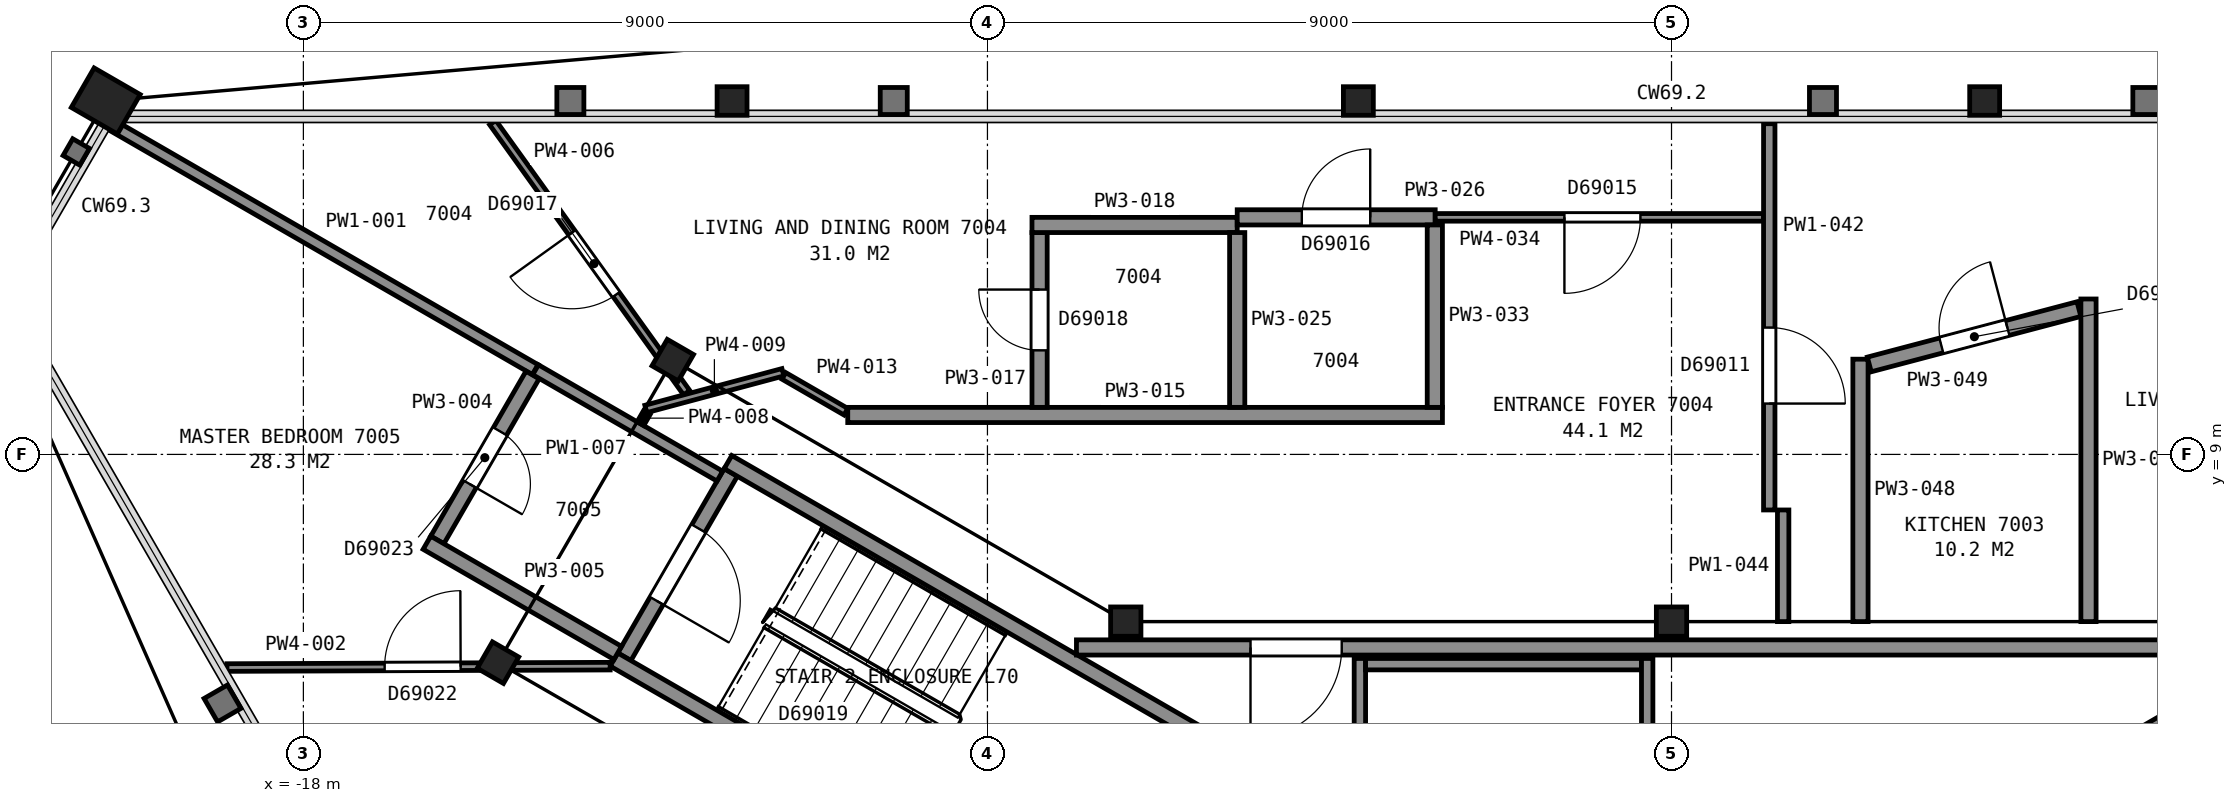
"""IFC4 building model, lengths in metres.
Left out: names, types, materials, properties, quantities, classifications, styles, units other than length and angle.
Written with IfcOpenShell. Run it as: python <this file> out.ifc"""

import sys

from ifc_helpers import new_model, si_unit, direction, frame, frame_2d, origin, origin_2d, place, context, subcontext, project, spatial, rectangle, hollow_rectangle, i_section, extrude, element, fill, save


model = new_model("IFC4")
c1 = context("Model", 3, precision=1e-05, world=origin(), true_north=direction((0.0, 1.0)))
c2 = subcontext(c1, "Body", "Model", "MODEL_VIEW")
j1 = project(units=[si_unit("LENGTHUNIT", "METRE"), si_unit("PLANEANGLEUNIT", "RADIAN")], contexts=[c1])
p1 = place(None, origin())
s1 = spatial("IfcSite", under=j1, at=p1, CompositionType="ELEMENT")
p2 = place(p1, origin())
s2 = spatial("IfcBuilding", under=s1, at=p2, CompositionType="ELEMENT")
p3 = place(p2, frame((0.0, 0.0, 278.8)))
s3 = spatial("IfcBuildingStorey", under=s2, at=p3, CompositionType="ELEMENT", Elevation=278.8)
for number, where, z_axis, x_axis in (
    (1, (4.12, 13.65, 0.0), (0.0, 0.0, 1.0), (1.0, 0.0, 0.0)),
    (2, (-4.12, 13.65, 0.0), (0.0, 0.0, 1.0), (1.0, 0.0, 0.0)),
    (3, (-12.36, 13.65, 0.0), (0.0, 0.0, 1.0), (1.0, 0.0, 0.0)),
):
    element("IfcColumn", number, at=place(p3, frame(where, z_axis=z_axis, x_axis=x_axis)), inside=s3, PredefinedType="COLUMN", context=c2, shape_type="SweptSolid", body=[
        extrude(i_section(OverallWidth=0.394, OverallDepth=0.376, WebThickness=0.017, FlangeThickness=0.028, FilletRadius=0.015, at=origin_2d()), origin(), (0.0, 0.0, 1.0), 3.7),
    ])
p4 = place(p3, frame((-20.6, 13.65, 0.0), z_axis=(0.0, 0.0, 1.0), x_axis=(0.5, 0.866025403784, 0.0)))
e4 = element("IfcColumn", 4, at=p4, inside=s3, PredefinedType="COLUMN", context=c2, shape_type="SweptSolid", body=[
    extrude(hollow_rectangle(XDim=0.6, YDim=0.7, WallThickness=0.04, at=origin_2d()), origin(), (0.0, 0.0, 1.0), 3.7),
])
for number, where, z_axis, x_axis in (
    (5, (0.0, 6.8, 0.0), (0.0, 0.0, 1.0), (1.0, 0.0, 0.0)),
    (6, (-7.18, 6.8, 0.0), (0.0, 0.0, 1.0), (1.0, 0.0, 0.0)),
):
    element("IfcColumn", number, at=place(p3, frame(where, z_axis=z_axis, x_axis=x_axis)), inside=s3, PredefinedType="COLUMN", context=c2, shape_type="SweptSolid", body=[
        extrude(i_section(OverallWidth=0.399, OverallDepth=0.386, WebThickness=0.021, FlangeThickness=0.033, FilletRadius=0.015, at=origin_2d()), origin(), (0.0, 0.0, 1.0), 3.7),
    ])
for number, where, z_axis, x_axis in (
    (7, (-13.14, 10.24, 0.0), (0.0, 0.0, 1.0), (0.5, 0.866, 0.0)),
    (8, (-15.44, 6.26, 0.0), (0.0, 0.0, 1.0), (0.5, 0.866, 0.0)),
):
    element("IfcColumn", number, at=place(p3, frame(where, z_axis=z_axis, x_axis=x_axis)), inside=s3, PredefinedType="COLUMN", context=c2, shape_type="SweptSolid", body=[
        extrude(i_section(OverallWidth=0.401, OverallDepth=0.399, WebThickness=0.025, FlangeThickness=0.04, FilletRadius=0.015, at=origin_2d()), origin(), (0.0, 0.0, 1.0), 3.7),
    ])
p5 = place(p3, frame((6.178, 5.299, 0.0), z_axis=(0.0, 0.0, 1.0), x_axis=(0.866033125095, 0.499986626058, 0.0)))
e9 = element("IfcWall", 9, at=p5, inside=s3, PredefinedType="PARTITIONING", context=c2, shape_type="SweptSolid", body=[
    extrude(rectangle(XDim=7.2, YDim=0.2, at=frame_2d((3.6, 0.0))), origin(), (0.0, 0.0, 1.0), 3.45),
])
p6 = place(p3, frame((-12.377, 8.762, 0.0), z_axis=(0.0, 0.0, 1.0), x_axis=(-0.500049511043, -0.865996816683, 0.0)))
e10 = element("IfcWall", 10, at=p6, inside=s3, PredefinedType="PARTITIONING", context=c2, shape_type="SweptSolid", body=[
    extrude(rectangle(XDim=2.8, YDim=0.2, at=frame_2d((1.4, 0.0))), origin(), (0.0, 0.0, 1.0), 3.45),
])
p7 = place(p6, frame((0.85, 0.0, 0.0)))
e11 = element("IfcOpeningElement", 11, at=p7, cuts=e10, PredefinedType="OPENING", context=c2, shape_type="SweptSolid", body=[
    extrude(rectangle(XDim=1.1, YDim=2.1, at=frame_2d((0.55, 1.05))), frame((0.0, 0.11, 0.0), z_axis=(0.0, -1.0, 0.0), x_axis=(1.0, 0.0, 0.0)), (0.0, 0.0, 1.0), 0.22),
])
for number, where, z_axis, x_axis in (
    (12, (-7.678, 2.701, 0.0), (0.0, 0.0, 1.0), (-0.866, 0.5, 0.0)),
    (13, (-6.178, 5.299, 0.0), (0.0, 0.0, 1.0), (-0.866, 0.5, 0.0)),
):
    element("IfcWall", number, at=place(p3, frame(where, z_axis=z_axis, x_axis=x_axis)), inside=s3, PredefinedType="PARTITIONING", context=c2, shape_type="SweptSolid", body=[
        extrude(rectangle(XDim=7.2, YDim=0.2, at=frame_2d((3.6, 0.0))), origin(), (0.0, 0.0, 1.0), 3.45),
    ])
p8 = place(p3, frame((7.829, 6.46, 0.0), z_axis=(0.0, 0.0, 1.0), x_axis=(-1.0, 0.0, 0.0)))
e14 = element("IfcWall", 14, at=p8, inside=s3, PredefinedType="PARTITIONING", context=c2, shape_type="SweptSolid", body=[
    extrude(rectangle(XDim=15.658, YDim=0.2, at=frame_2d((7.829, 0.0))), origin(), (0.0, 0.0, 1.0), 3.45),
])
p9 = place(p8, frame((12.168, 0.0, 0.0)))
e15 = element("IfcOpeningElement", 15, at=p9, cuts=e14, PredefinedType="OPENING", context=c2, shape_type="SweptSolid", body=[
    extrude(rectangle(XDim=1.2, YDim=2.1, at=frame_2d((0.6, 1.05))), frame((0.0, 0.11, 0.0), z_axis=(0.0, -1.0, 0.0), x_axis=(1.0, 0.0, 0.0)), (0.0, 0.0, 1.0), 0.22),
])
p10 = place(p3, frame((-4.1, 2.085, 0.0), z_axis=(0.0, 0.0, 1.0), x_axis=(0.0, 1.0, 0.0)))
e16 = element("IfcWall", 16, at=p10, inside=s3, PredefinedType="PARTITIONING", context=c2, shape_type="SweptSolid", body=[
    extrude(rectangle(XDim=4.23, YDim=0.15, at=frame_2d((2.115, 0.0))), origin(), (0.0, 0.0, 1.0), 3.45),
])
p11 = place(p10, frame((1.625, 0.0, 0.0)))
e17 = element("IfcOpeningElement", 17, at=p11, cuts=e16, PredefinedType="OPENING", context=c2, shape_type="SweptSolid", body=[
    extrude(rectangle(XDim=1.0, YDim=2.1, at=frame_2d((0.5, 1.05))), frame((0.0, 0.085, 0.0), z_axis=(0.0, -1.0, 0.0), x_axis=(1.0, 0.0, 0.0)), (0.0, 0.0, 1.0), 0.17),
])
p12 = place(p3, frame((-4.025, 6.24, 0.0), z_axis=(0.0, 0.0, 1.0), x_axis=(1.0, 0.0, 0.0)))
e18 = element("IfcWall", 18, at=p12, inside=s3, PredefinedType="PARTITIONING", context=c2, shape_type="SweptSolid", body=[
    extrude(rectangle(XDim=3.63, YDim=0.15, at=frame_2d((1.815, 0.0))), origin(), (0.0, 0.0, 1.0), 3.45),
])
p13 = place(p3, frame((-0.32, 2.252, 0.0), z_axis=(0.0, 0.0, 1.0), x_axis=(0.0, 1.0, 0.0)))
e19 = element("IfcWall", 19, at=p13, inside=s3, PredefinedType="PARTITIONING", context=c2, shape_type="SweptSolid", body=[
    extrude(rectangle(XDim=4.063, YDim=0.15, at=frame_2d((2.031, 0.0))), origin(), (0.0, 0.0, 1.0), 3.45),
])
p14 = place(p3, frame((-20.506, 13.324, 0.0), z_axis=(0.0, 0.0, 1.0), x_axis=(0.866004971522, -0.500035388047, 0.0)))
e20 = element("IfcWall", 20, at=p14, inside=s3, PredefinedType="PARTITIONING", context=c2, shape_type="SweptSolid", body=[
    extrude(rectangle(XDim=6.416, YDim=0.15, at=frame_2d((3.208, 0.0))), origin(), (0.0, 0.0, 1.0), 2.723),
])
p15 = place(p3, frame((-19.005, 6.196, 0.0), z_axis=(0.0, 0.0, 1.0), x_axis=(0.999993403855, 0.003632113191, 0.0)))
e21 = element("IfcWall", 21, at=p15, inside=s3, PredefinedType="PARTITIONING", context=c2, shape_type="SweptSolid", body=[
    extrude(rectangle(XDim=5.041, YDim=0.1, at=frame_2d((2.521, 0.0))), origin(), (0.0, 0.0, 1.0), 2.723),
])
p16 = place(p15, frame((2.074, 0.0, 0.0)))
e22 = element("IfcOpeningElement", 22, at=p16, cuts=e21, PredefinedType="OPENING", context=c2, shape_type="SweptSolid", body=[
    extrude(rectangle(XDim=1.0, YDim=2.1, at=frame_2d((0.5, 1.05))), frame((0.0, 0.06, 0.0), z_axis=(0.0, -1.0, 0.0), x_axis=(1.0, 0.0, 0.0)), (0.0, 0.0, 1.0), 0.12),
])
p17 = place(p3, frame((-14.985, 10.045, 0.0), z_axis=(0.0, 0.0, 1.0), x_axis=(-0.499995137693, -0.86602821102, 0.0)))
e23 = element("IfcWall", 23, at=p17, inside=s3, PredefinedType="PARTITIONING", context=c2, shape_type="SweptSolid", body=[
    extrude(rectangle(XDim=2.506, YDim=0.2, at=frame_2d((1.253, 0.0))), origin(), (0.0, 0.0, 1.0), 2.723),
])
p18 = place(p17, frame((0.856, 0.0, 0.0)))
e24 = element("IfcOpeningElement", 24, at=p18, cuts=e23, PredefinedType="OPENING", context=c2, shape_type="SweptSolid", body=[
    extrude(rectangle(XDim=0.8, YDim=2.1, at=frame_2d((0.4, 1.05))), frame((0.0, 0.11, 0.0), z_axis=(0.0, -1.0, 0.0), x_axis=(1.0, 0.0, 0.0)), (0.0, 0.0, 1.0), 0.22),
])
p19 = place(p3, frame((-16.375, 7.838, 0.0), z_axis=(0.0, 0.0, 1.0), x_axis=(0.865912083802, -0.500196224622, 0.0)))
e25 = element("IfcWall", 25, at=p19, inside=s3, PredefinedType="PARTITIONING", context=c2, shape_type="SweptSolid", body=[
    extrude(rectangle(XDim=2.899, YDim=0.2, at=frame_2d((1.45, 0.0))), origin(), (0.0, 0.0, 1.0), 2.723),
])
p20 = place(p3, frame((-12.957, 9.812, 0.0), z_axis=(0.0, 0.0, 1.0), x_axis=(-0.58313691272, 0.812373892381, 0.0)))
e26 = element("IfcWall", 26, at=p20, inside=s3, PredefinedType="PARTITIONING", context=c2, shape_type="SweptSolid", body=[
    extrude(rectangle(XDim=4.375, YDim=0.1, at=frame_2d((2.188, 0.0))), origin(), (0.0, 0.0, 1.0), 2.723),
])
p21 = place(p20, frame((1.59, 0.0, 0.0)))
e27 = element("IfcOpeningElement", 27, at=p21, cuts=e26, PredefinedType="OPENING", context=c2, shape_type="SweptSolid", body=[
    extrude(rectangle(XDim=1.0, YDim=2.1, at=frame_2d((0.5, 1.05))), frame((0.0, 0.06, 0.0), z_axis=(0.0, -1.0, 0.0), x_axis=(1.0, 0.0, 0.0)), (0.0, 0.0, 1.0), 0.12),
])
p22 = place(p3, frame((-14.945, 10.114, 0.0), z_axis=(0.0, 0.0, 1.0), x_axis=(0.865969158485, -0.500097407065, 0.0)))
e28 = element("IfcWall", 28, at=p22, inside=s3, PredefinedType="PARTITIONING", context=c2, shape_type="SweptSolid", body=[
    extrude(rectangle(XDim=2.799, YDim=0.15, at=frame_2d((1.4, 0.0))), origin(), (0.0, 0.0, 1.0), 2.723),
])
p23 = place(p3, frame((-13.565, 9.404, 0.0), z_axis=(0.0, 0.0, 1.0), x_axis=(0.500181256421, 0.865920730047, 0.0)))
e29 = element("IfcWall", 29, at=p23, inside=s3, PredefinedType="PARTITIONING", context=c2, shape_type="SweptSolid", body=[
    extrude(rectangle(XDim=0.169, YDim=0.1, at=frame_2d((0.084, 0.0))), origin(), (0.0, 0.0, 1.0), 2.723),
])
p24 = place(p3, frame((-13.494, 9.598, 0.0), z_axis=(0.0, 0.0, 1.0), x_axis=(0.96601104623, 0.258500790254, 0.0)))
e30 = element("IfcWall", 30, at=p24, inside=s3, PredefinedType="PARTITIONING", context=c2, shape_type="SweptSolid", body=[
    extrude(rectangle(XDim=1.867, YDim=0.1, at=frame_2d((0.934, 0.0))), origin(), (0.0, 0.0, 1.0), 2.723),
])
p25 = place(p3, frame((-11.678, 10.033, 0.0), z_axis=(0.0, 0.0, 1.0), x_axis=(0.866116627388, -0.499841962787, 0.0)))
e31 = element("IfcWall", 31, at=p25, inside=s3, PredefinedType="PARTITIONING", context=c2, shape_type="SweptSolid", body=[
    extrude(rectangle(XDim=0.943, YDim=0.1, at=frame_2d((0.472, 0.0))), origin(), (0.0, 0.0, 1.0), 2.723),
])
p26 = place(p3, frame((-10.838, 9.519, 0.0), z_axis=(0.0, 0.0, 1.0), x_axis=(1.0, 0.0, 0.0)))
e32 = element("IfcWall", 32, at=p26, inside=s3, PredefinedType="PARTITIONING", context=c2, shape_type="SweptSolid", body=[
    extrude(rectangle(XDim=7.824, YDim=0.2, at=frame_2d((3.912, 0.0))), origin(), (0.0, 0.0, 1.0), 2.723),
])
p27 = place(p3, frame((-8.314, 11.919, 0.0), z_axis=(0.0, 0.0, 1.0), x_axis=(0.0, -1.0, 0.0)))
e33 = element("IfcWall", 33, at=p27, inside=s3, PredefinedType="PARTITIONING", context=c2, shape_type="SweptSolid", body=[
    extrude(rectangle(XDim=2.3, YDim=0.2, at=frame_2d((1.15, 0.0))), origin(), (0.0, 0.0, 1.0), 2.723),
])
p28 = place(p27, frame((0.75, 0.0, 0.0)))
e34 = element("IfcOpeningElement", 34, at=p28, cuts=e33, PredefinedType="OPENING", context=c2, shape_type="SweptSolid", body=[
    extrude(rectangle(XDim=0.8, YDim=2.1, at=frame_2d((0.4, 1.05))), frame((0.0, 0.11, 0.0), z_axis=(0.0, -1.0, 0.0), x_axis=(1.0, 0.0, 0.0)), (0.0, 0.0, 1.0), 0.22),
])
p29 = place(p3, frame((-8.414, 12.019, 0.0), z_axis=(0.0, 0.0, 1.0), x_axis=(1.0, 0.0, 0.0)))
e35 = element("IfcWall", 35, at=p29, inside=s3, PredefinedType="PARTITIONING", context=c2, shape_type="SweptSolid", body=[
    extrude(rectangle(XDim=2.7, YDim=0.2, at=frame_2d((1.35, 0.0))), origin(), (0.0, 0.0, 1.0), 2.723),
])
p30 = place(p3, frame((-5.714, 9.619, 0.0), z_axis=(0.0, 0.0, 1.0), x_axis=(0.0, 1.0, 0.0)))
e36 = element("IfcWall", 36, at=p30, inside=s3, PredefinedType="PARTITIONING", context=c2, shape_type="SweptSolid", body=[
    extrude(rectangle(XDim=2.3, YDim=0.2, at=frame_2d((1.15, 0.0))), origin(), (0.0, 0.0, 1.0), 2.723),
])
p31 = place(p3, frame((-3.109, 12.119, 0.0), z_axis=(0.0, 0.0, 1.0), x_axis=(-1.0, 0.0, 0.0)))
e37 = element("IfcWall", 37, at=p31, inside=s3, PredefinedType="PARTITIONING", context=c2, shape_type="SweptSolid", body=[
    extrude(rectangle(XDim=2.605, YDim=0.2, at=frame_2d((1.303, 0.0))), origin(), (0.0, 0.0, 1.0), 2.723),
])
p32 = place(p31, frame((0.855, 0.0, 0.0)))
e38 = element("IfcOpeningElement", 38, at=p32, cuts=e37, PredefinedType="OPENING", context=c2, shape_type="SweptSolid", body=[
    extrude(rectangle(XDim=0.9, YDim=2.1, at=frame_2d((0.45, 1.05))), frame((0.0, 0.11, 0.0), z_axis=(0.0, -1.0, 0.0), x_axis=(1.0, 0.0, 0.0)), (0.0, 0.0, 1.0), 0.22),
])
p33 = place(p3, frame((-3.114, 9.619, 0.0), z_axis=(0.0, 0.0, 1.0), x_axis=(0.0, 1.0, 0.0)))
e39 = element("IfcWall", 39, at=p33, inside=s3, PredefinedType="PARTITIONING", context=c2, shape_type="SweptSolid", body=[
    extrude(rectangle(XDim=2.4, YDim=0.2, at=frame_2d((1.2, 0.0))), origin(), (0.0, 0.0, 1.0), 2.723),
])
p34 = place(p3, frame((-3.109, 12.119, 0.0), z_axis=(0.0, 0.0, 1.0), x_axis=(1.0, 0.0, 0.0)))
e40 = element("IfcWall", 40, at=p34, inside=s3, PredefinedType="PARTITIONING", context=c2, shape_type="SweptSolid", body=[
    extrude(rectangle(XDim=4.32, YDim=0.1, at=frame_2d((2.16, 0.0))), origin(), (0.0, 0.0, 1.0), 2.723),
])
p35 = place(p34, frame((1.7, 0.0, 0.0)))
e41 = element("IfcOpeningElement", 41, at=p35, cuts=e40, PredefinedType="OPENING", context=c2, shape_type="SweptSolid", body=[
    extrude(rectangle(XDim=1.0, YDim=2.1, at=frame_2d((0.5, 1.05))), frame((0.0, 0.06, 0.0), z_axis=(0.0, -1.0, 0.0), x_axis=(1.0, 0.0, 0.0)), (0.0, 0.0, 1.0), 0.12),
])
p36 = place(p3, frame((1.286, 13.351, 0.0), z_axis=(0.0, 0.0, 1.0), x_axis=(0.0, -1.0, 0.0)))
e42 = element("IfcWall", 42, at=p36, inside=s3, PredefinedType="PARTITIONING", context=c2, shape_type="SweptSolid", body=[
    extrude(rectangle(XDim=5.082, YDim=0.15, at=frame_2d((2.541, 0.0))), origin(), (0.0, 0.0, 1.0), 2.723),
])
p37 = place(p36, frame((2.682, 0.0, 0.0)))
e43 = element("IfcOpeningElement", 43, at=p37, cuts=e42, PredefinedType="OPENING", context=c2, shape_type="SweptSolid", body=[
    extrude(rectangle(XDim=1.0, YDim=2.1, at=frame_2d((0.5, 1.05))), frame((0.0, 0.085, 0.0), z_axis=(0.0, -1.0, 0.0), x_axis=(1.0, 0.0, 0.0)), (0.0, 0.0, 1.0), 0.17),
])
p38 = place(p3, frame((1.469, 6.8, 0.0), z_axis=(0.0, 0.0, 1.0), x_axis=(0.0, 1.0, 0.0)))
e44 = element("IfcWall", 44, at=p38, inside=s3, PredefinedType="PARTITIONING", context=c2, shape_type="SweptSolid", body=[
    extrude(rectangle(XDim=1.469, YDim=0.15, at=frame_2d((0.734, 0.0))), origin(), (0.0, 0.0, 1.0), 2.723),
])
p39 = place(p3, frame((2.486, 6.8, 0.0), z_axis=(0.0, 0.0, 1.0), x_axis=(0.0, 1.0, 0.0)))
e45 = element("IfcWall", 45, at=p39, inside=s3, PredefinedType="PARTITIONING", context=c2, shape_type="SweptSolid", body=[
    extrude(rectangle(XDim=3.453, YDim=0.2, at=frame_2d((1.727, 0.0))), origin(), (0.0, 0.0, 1.0), 2.723),
])
p40 = place(p3, frame((5.36, 10.912, 0.0), z_axis=(0.0, 0.0, 1.0), x_axis=(-0.966866921155, -0.255280936963, 0.0)))
e46 = element("IfcWall", 46, at=p40, inside=s3, PredefinedType="PARTITIONING", context=c2, shape_type="SweptSolid", body=[
    extrude(rectangle(XDim=2.853, YDim=0.2, at=frame_2d((1.426, 0.0))), origin(), (0.0, 0.0, 1.0), 2.723),
])
p41 = place(p40, frame((0.973, 0.0, 0.0)))
e47 = element("IfcOpeningElement", 47, at=p41, cuts=e46, PredefinedType="OPENING", context=c2, shape_type="SweptSolid", body=[
    extrude(rectangle(XDim=0.9, YDim=2.1, at=frame_2d((0.45, 1.05))), frame((0.0, 0.11, 0.0), z_axis=(0.0, -1.0, 0.0), x_axis=(1.0, 0.0, 0.0)), (0.0, 0.0, 1.0), 0.22),
])
p42 = place(p3, frame((5.486, 6.8, 0.0), z_axis=(0.0, 0.0, 1.0), x_axis=(0.0, 1.0, 0.0)))
e48 = element("IfcWall", 48, at=p42, inside=s3, PredefinedType="PARTITIONING", context=c2, shape_type="SweptSolid", body=[
    extrude(rectangle(XDim=4.245, YDim=0.2, at=frame_2d((2.123, 0.0))), origin(), (0.0, 0.0, 1.0), 2.723),
])
p43 = place(p7, origin())
e49 = element("IfcDoor", 49, at=p43, inside=s3, OperationType="SINGLE_SWING_RIGHT", PredefinedType="DOOR", context=c2, shape_type="SweptSolid", body=[
    extrude(rectangle(XDim=1.1, YDim=2.1, at=frame_2d((0.55, 1.05))), frame((0.0, 0.025, 0.0), z_axis=(0.0, -1.0, 0.0), x_axis=(1.0, 0.0, 0.0)), (0.0, 0.0, 1.0), 0.05),
])
fill(e11, e49)
p44 = place(p9, origin())
e50 = element("IfcDoor", 50, at=p44, inside=s3, OperationType="SINGLE_SWING_RIGHT", PredefinedType="DOOR", context=c2, shape_type="SweptSolid", body=[
    extrude(rectangle(XDim=1.2, YDim=2.1, at=frame_2d((0.6, 1.05))), frame((0.0, 0.025, 0.0), z_axis=(0.0, -1.0, 0.0), x_axis=(1.0, 0.0, 0.0)), (0.0, 0.0, 1.0), 0.05),
])
fill(e15, e50)
p45 = place(p16, origin())
e51 = element("IfcDoor", 51, at=p45, inside=s3, OperationType="SINGLE_SWING_RIGHT", PredefinedType="DOOR", context=c2, shape_type="SweptSolid", body=[
    extrude(rectangle(XDim=1.0, YDim=2.1, at=frame_2d((0.5, 1.05))), frame((0.0, 0.025, 0.0), z_axis=(0.0, -1.0, 0.0), x_axis=(1.0, 0.0, 0.0)), (0.0, 0.0, 1.0), 0.05),
])
fill(e22, e51)
p46 = place(p18, origin())
e52 = element("IfcDoor", 52, at=p46, inside=s3, OperationType="SINGLE_SWING_RIGHT", PredefinedType="DOOR", context=c2, shape_type="SweptSolid", body=[
    extrude(rectangle(XDim=0.8, YDim=2.1, at=frame_2d((0.4, 1.05))), frame((0.0, 0.025, 0.0), z_axis=(0.0, -1.0, 0.0), x_axis=(1.0, 0.0, 0.0)), (0.0, 0.0, 1.0), 0.05),
])
fill(e24, e52)
p47 = place(p21, origin())
e53 = element("IfcDoor", 53, at=p47, inside=s3, OperationType="SINGLE_SWING_RIGHT", PredefinedType="DOOR", context=c2, shape_type="SweptSolid", body=[
    extrude(rectangle(XDim=1.0, YDim=2.1, at=frame_2d((0.5, 1.05))), frame((0.0, 0.025, 0.0), z_axis=(0.0, -1.0, 0.0), x_axis=(1.0, 0.0, 0.0)), (0.0, 0.0, 1.0), 0.05),
])
fill(e27, e53)
p48 = place(p28, origin())
e54 = element("IfcDoor", 54, at=p48, inside=s3, OperationType="SINGLE_SWING_LEFT", PredefinedType="DOOR", context=c2, shape_type="SweptSolid", body=[
    extrude(rectangle(XDim=0.8, YDim=2.1, at=frame_2d((0.4, 1.05))), frame((0.0, 0.025, 0.0), z_axis=(0.0, -1.0, 0.0), x_axis=(1.0, 0.0, 0.0)), (0.0, 0.0, 1.0), 0.05),
])
fill(e34, e54)
p49 = place(p32, origin())
e55 = element("IfcDoor", 55, at=p49, inside=s3, OperationType="SINGLE_SWING_LEFT", PredefinedType="DOOR", context=c2, shape_type="SweptSolid", body=[
    extrude(rectangle(XDim=0.9, YDim=2.1, at=frame_2d((0.45, 1.05))), frame((0.0, 0.025, 0.0), z_axis=(0.0, -1.0, 0.0), x_axis=(1.0, 0.0, 0.0)), (0.0, 0.0, 1.0), 0.05),
])
fill(e38, e55)
p50 = place(p35, origin())
e56 = element("IfcDoor", 56, at=p50, inside=s3, OperationType="SINGLE_SWING_LEFT", PredefinedType="DOOR", context=c2, shape_type="SweptSolid", body=[
    extrude(rectangle(XDim=1.0, YDim=2.1, at=frame_2d((0.5, 1.05))), frame((0.0, 0.025, 0.0), z_axis=(0.0, -1.0, 0.0), x_axis=(1.0, 0.0, 0.0)), (0.0, 0.0, 1.0), 0.05),
])
fill(e41, e56)
p51 = place(p37, origin())
e57 = element("IfcDoor", 57, at=p51, inside=s3, OperationType="SINGLE_SWING_RIGHT", PredefinedType="DOOR", context=c2, shape_type="SweptSolid", body=[
    extrude(rectangle(XDim=1.0, YDim=2.1, at=frame_2d((0.5, 1.05))), frame((0.0, 0.025, 0.0), z_axis=(0.0, -1.0, 0.0), x_axis=(1.0, 0.0, 0.0)), (0.0, 0.0, 1.0), 0.05),
])
fill(e43, e57)
p52 = place(p41, origin())
e58 = element("IfcDoor", 58, at=p52, inside=s3, OperationType="SINGLE_SWING_LEFT", PredefinedType="DOOR", context=c2, shape_type="SweptSolid", body=[
    extrude(rectangle(XDim=0.9, YDim=2.1, at=frame_2d((0.45, 1.05))), frame((0.0, 0.025, 0.0), z_axis=(0.0, -1.0, 0.0), x_axis=(1.0, 0.0, 0.0)), (0.0, 0.0, 1.0), 0.05),
])
fill(e47, e58)
save(model, sys.argv[1])
